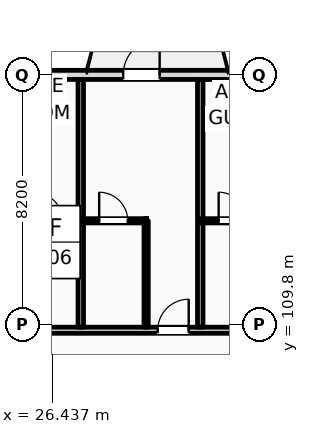
"""IFC4 building model, lengths in metres.
Left out: names, types, materials, properties, quantities, classifications, styles, units other than length and angle.
Written with IfcOpenShell. Run it as: python <this file> out.ifc"""

import sys

from ifc_helpers import new_model, si_unit, direction, frame, frame_2d, origin, place, context, subcontext, project, spatial, rectangle, extrude, element, fill, save


model = new_model("IFC4")
c1 = context("Model", 3, precision=1e-05, world=origin(), true_north=direction((0.0, 1.0)))
c2 = subcontext(c1, "Body", "Model", "MODEL_VIEW")
j1 = project(units=[si_unit("LENGTHUNIT", "METRE"), si_unit("PLANEANGLEUNIT", "RADIAN")], contexts=[c1])
p1 = place(None, origin())
s1 = spatial("IfcSite", under=j1, at=p1, CompositionType="ELEMENT")
p2 = place(p1, origin())
s2 = spatial("IfcBuilding", under=s1, at=p2, CompositionType="ELEMENT")
p3 = place(p2, frame((0.0, 0.0, 24.6)))
s3 = spatial("IfcBuildingStorey", under=s2, at=p3, CompositionType="ELEMENT", Elevation=24.6)
p4 = place(p3, frame((22.5, 118.0, 0.0), z_axis=(0.0, 0.0, 1.0), x_axis=(1.0, 0.0, 0.0)))
e1 = element("IfcWall", 1, at=p4, inside=s3, PredefinedType="STANDARD", context=c2, shape_type="SweptSolid", body=[
    extrude(rectangle(XDim=97.5, YDim=0.3, at=frame_2d((48.75, 0.0))), origin(), (0.0, 0.0, 1.0), 2.78),
])
p5 = place(p4, frame((0.91, 0.0, 0.9)))
e2 = element("IfcOpeningElement", 2, at=p5, cuts=e1, PredefinedType="OPENING", context=c2, shape_type="SweptSolid", body=[
    extrude(rectangle(XDim=0.9, YDim=1.7, at=frame_2d((0.45, 0.85))), frame((0.0, 0.16, 0.0), z_axis=(0.0, -1.0, 0.0), x_axis=(1.0, 0.0, 0.0)), (0.0, 0.0, 1.0), 0.32),
])
p6 = place(p4, frame((6.275, 0.0, 0.0)))
e3 = element("IfcOpeningElement", 3, at=p6, cuts=e1, PredefinedType="OPENING", context=c2, shape_type="SweptSolid", body=[
    extrude(rectangle(XDim=1.2, YDim=2.25, at=frame_2d((0.6, 1.125))), frame((0.0, 0.16, 0.0), z_axis=(0.0, -1.0, 0.0), x_axis=(1.0, 0.0, 0.0)), (0.0, 0.0, 1.0), 0.32),
])
p7 = place(p4, frame((11.42, 0.0, 0.9)))
e4 = element("IfcOpeningElement", 4, at=p7, cuts=e1, PredefinedType="OPENING", context=c2, shape_type="SweptSolid", body=[
    extrude(rectangle(XDim=1.35, YDim=1.7, at=frame_2d((0.675, 0.85))), frame((0.0, 0.16, 0.0), z_axis=(0.0, -1.0, 0.0), x_axis=(1.0, 0.0, 0.0)), (0.0, 0.0, 1.0), 0.32),
])
p8 = place(p4, frame((14.345, 0.0, 0.9)))
e5 = element("IfcOpeningElement", 5, at=p8, cuts=e1, PredefinedType="OPENING", context=c2, shape_type="SweptSolid", body=[
    extrude(rectangle(XDim=1.8, YDim=1.7, at=frame_2d((0.9, 0.85))), frame((0.0, 0.16, 0.0), z_axis=(0.0, -1.0, 0.0), x_axis=(1.0, 0.0, 0.0)), (0.0, 0.0, 1.0), 0.32),
])
p9 = place(p4, frame((19.27, 0.0, 0.9)))
e6 = element("IfcOpeningElement", 6, at=p9, cuts=e1, PredefinedType="OPENING", context=c2, shape_type="SweptSolid", body=[
    extrude(rectangle(XDim=1.95, YDim=1.7, at=frame_2d((0.975, 0.85))), frame((0.0, 0.16, 0.0), z_axis=(0.0, -1.0, 0.0), x_axis=(1.0, 0.0, 0.0)), (0.0, 0.0, 1.0), 0.32),
])
p10 = place(p4, frame((22.97, 0.0, 0.0)))
e7 = element("IfcOpeningElement", 7, at=p10, cuts=e1, PredefinedType="OPENING", context=c2, shape_type="SweptSolid", body=[
    extrude(rectangle(XDim=1.2, YDim=2.25, at=frame_2d((0.6, 1.125))), frame((0.0, 0.16, 0.0), z_axis=(0.0, -1.0, 0.0), x_axis=(1.0, 0.0, 0.0)), (0.0, 0.0, 1.0), 0.32),
])
p11 = place(p4, frame((26.92, 0.0, 0.9)))
e8 = element("IfcOpeningElement", 8, at=p11, cuts=e1, PredefinedType="OPENING", context=c2, shape_type="SweptSolid", body=[
    extrude(rectangle(XDim=2.25, YDim=1.7, at=frame_2d((1.125, 0.85))), frame((0.0, 0.16, 0.0), z_axis=(0.0, -1.0, 0.0), x_axis=(1.0, 0.0, 0.0)), (0.0, 0.0, 1.0), 0.32),
])
p12 = place(p4, frame((30.645, 0.0, 0.9)))
e9 = element("IfcOpeningElement", 9, at=p12, cuts=e1, PredefinedType="OPENING", context=c2, shape_type="SweptSolid", body=[
    extrude(rectangle(XDim=2.4, YDim=1.7, at=frame_2d((1.2, 0.85))), frame((0.0, 0.16, 0.0), z_axis=(0.0, -1.0, 0.0), x_axis=(1.0, 0.0, 0.0)), (0.0, 0.0, 1.0), 0.32),
])
p13 = place(p4, frame((36.71, 0.0, 0.0)))
e10 = element("IfcOpeningElement", 10, at=p13, cuts=e1, PredefinedType="OPENING", context=c2, shape_type="SweptSolid", body=[
    extrude(rectangle(XDim=1.2, YDim=2.25, at=frame_2d((0.6, 1.125))), frame((0.0, 0.16, 0.0), z_axis=(0.0, -1.0, 0.0), x_axis=(1.0, 0.0, 0.0)), (0.0, 0.0, 1.0), 0.32),
])
p14 = place(p4, frame((39.17, 0.0, 0.0)))
e11 = element("IfcOpeningElement", 11, at=p14, cuts=e1, PredefinedType="OPENING", context=c2, shape_type="SweptSolid", body=[
    extrude(rectangle(XDim=1.2, YDim=2.25, at=frame_2d((0.6, 1.125))), frame((0.0, 0.16, 0.0), z_axis=(0.0, -1.0, 0.0), x_axis=(1.0, 0.0, 0.0)), (0.0, 0.0, 1.0), 0.32),
])
p15 = place(p4, frame((43.22, 0.0, 0.9)))
e12 = element("IfcOpeningElement", 12, at=p15, cuts=e1, PredefinedType="OPENING", context=c2, shape_type="SweptSolid", body=[
    extrude(rectangle(XDim=2.85, YDim=1.7, at=frame_2d((1.425, 0.85))), frame((0.0, 0.16, 0.0), z_axis=(0.0, -1.0, 0.0), x_axis=(1.0, 0.0, 0.0)), (0.0, 0.0, 1.0), 0.32),
])
p16 = place(p4, frame((47.29, 0.0, 0.9)))
e13 = element("IfcOpeningElement", 13, at=p16, cuts=e1, PredefinedType="OPENING", context=c2, shape_type="SweptSolid", body=[
    extrude(rectangle(XDim=1.35, YDim=1.7, at=frame_2d((0.675, 0.85))), frame((0.0, 0.16, 0.0), z_axis=(0.0, -1.0, 0.0), x_axis=(1.0, 0.0, 0.0)), (0.0, 0.0, 1.0), 0.32),
])
p17 = place(p4, frame((52.91, 0.0, 0.0)))
e14 = element("IfcOpeningElement", 14, at=p17, cuts=e1, PredefinedType="OPENING", context=c2, shape_type="SweptSolid", body=[
    extrude(rectangle(XDim=1.2, YDim=2.25, at=frame_2d((0.6, 1.125))), frame((0.0, 0.16, 0.0), z_axis=(0.0, -1.0, 0.0), x_axis=(1.0, 0.0, 0.0)), (0.0, 0.0, 1.0), 0.32),
])
p18 = place(p4, frame((55.69, 0.0, 0.9)))
e15 = element("IfcOpeningElement", 15, at=p18, cuts=e1, PredefinedType="OPENING", context=c2, shape_type="SweptSolid", body=[
    extrude(rectangle(XDim=0.9, YDim=1.7, at=frame_2d((0.45, 0.85))), frame((0.0, 0.16, 0.0), z_axis=(0.0, -1.0, 0.0), x_axis=(1.0, 0.0, 0.0)), (0.0, 0.0, 1.0), 0.32),
])
p19 = place(p4, frame((59.82, 0.0, 0.9)))
e16 = element("IfcOpeningElement", 16, at=p19, cuts=e1, PredefinedType="OPENING", context=c2, shape_type="SweptSolid", body=[
    extrude(rectangle(XDim=3.25, YDim=1.7, at=frame_2d((1.625, 0.85))), frame((0.0, 0.16, 0.0), z_axis=(0.0, -1.0, 0.0), x_axis=(1.0, 0.0, 0.0)), (0.0, 0.0, 1.0), 0.32),
])
p20 = place(p4, frame((65.89, 0.0, 0.9)))
e17 = element("IfcOpeningElement", 17, at=p20, cuts=e1, PredefinedType="OPENING", context=c2, shape_type="SweptSolid", body=[
    extrude(rectangle(XDim=1.1, YDim=1.7, at=frame_2d((0.55, 0.85))), frame((0.0, 0.16, 0.0), z_axis=(0.0, -1.0, 0.0), x_axis=(1.0, 0.0, 0.0)), (0.0, 0.0, 1.0), 0.32),
])
p21 = place(p4, frame((69.245, 0.0, 0.0)))
e18 = element("IfcOpeningElement", 18, at=p21, cuts=e1, PredefinedType="OPENING", context=c2, shape_type="SweptSolid", body=[
    extrude(rectangle(XDim=1.2, YDim=2.25, at=frame_2d((0.6, 1.125))), frame((0.0, 0.16, 0.0), z_axis=(0.0, -1.0, 0.0), x_axis=(1.0, 0.0, 0.0)), (0.0, 0.0, 1.0), 0.32),
])
p22 = place(p4, frame((73.69, 0.0, 0.9)))
e19 = element("IfcOpeningElement", 19, at=p22, cuts=e1, PredefinedType="OPENING", context=c2, shape_type="SweptSolid", body=[
    extrude(rectangle(XDim=1.8, YDim=1.7, at=frame_2d((0.9, 0.85))), frame((0.0, 0.16, 0.0), z_axis=(0.0, -1.0, 0.0), x_axis=(1.0, 0.0, 0.0)), (0.0, 0.0, 1.0), 0.32),
])
p23 = place(p4, frame((76.62, 0.0, 0.9)))
e20 = element("IfcOpeningElement", 20, at=p23, cuts=e1, PredefinedType="OPENING", context=c2, shape_type="SweptSolid", body=[
    extrude(rectangle(XDim=3.25, YDim=1.7, at=frame_2d((1.625, 0.85))), frame((0.0, 0.16, 0.0), z_axis=(0.0, -1.0, 0.0), x_axis=(1.0, 0.0, 0.0)), (0.0, 0.0, 1.0), 0.32),
])
p24 = place(p4, frame((81.895, 0.0, 0.9)))
e21 = element("IfcOpeningElement", 21, at=p24, cuts=e1, PredefinedType="OPENING", context=c2, shape_type="SweptSolid", body=[
    extrude(rectangle(XDim=1.1, YDim=1.5, at=frame_2d((0.55, 0.75))), frame((0.0, 0.16, 0.0), z_axis=(0.0, -1.0, 0.0), x_axis=(1.0, 0.0, 0.0)), (0.0, 0.0, 1.0), 0.32),
])
p25 = place(p4, frame((86.02, 0.0, 0.9)))
e22 = element("IfcOpeningElement", 22, at=p25, cuts=e1, PredefinedType="OPENING", context=c2, shape_type="SweptSolid", body=[
    extrude(rectangle(XDim=1.25, YDim=1.6, at=frame_2d((0.625, 0.8))), frame((0.0, 0.16, 0.0), z_axis=(0.0, -1.0, 0.0), x_axis=(1.0, 0.0, 0.0)), (0.0, 0.0, 1.0), 0.32),
])
p26 = place(p4, frame((90.145, 0.0, 0.9)))
e23 = element("IfcOpeningElement", 23, at=p26, cuts=e1, PredefinedType="OPENING", context=c2, shape_type="SweptSolid", body=[
    extrude(rectangle(XDim=1.4, YDim=1.7, at=frame_2d((0.7, 0.85))), frame((0.0, 0.16, 0.0), z_axis=(0.0, -1.0, 0.0), x_axis=(1.0, 0.0, 0.0)), (0.0, 0.0, 1.0), 0.32),
])
p27 = place(p4, frame((94.155, 0.0, 0.9)))
e24 = element("IfcOpeningElement", 24, at=p27, cuts=e1, PredefinedType="OPENING", context=c2, shape_type="SweptSolid", body=[
    extrude(rectangle(XDim=1.6, YDim=1.7, at=frame_2d((0.8, 0.85))), frame((0.0, 0.16, 0.0), z_axis=(0.0, -1.0, 0.0), x_axis=(1.0, 0.0, 0.0)), (0.0, 0.0, 1.0), 0.32),
])
p28 = place(p3, frame((10.65, 109.6, 0.0), z_axis=(0.0, 0.0, 1.0), x_axis=(1.0, 0.0, 0.0)))
e25 = element("IfcWall", 25, at=p28, inside=s3, PredefinedType="PARTITIONING", context=c2, shape_type="SweptSolid", body=[
    extrude(rectangle(XDim=109.21, YDim=0.2, at=frame_2d((54.605, 0.0))), origin(), (0.0, 0.0, 1.0), 2.78),
])
p29 = place(p28, frame((12.705, 0.0, 0.0)))
e26 = element("IfcOpeningElement", 26, at=p29, cuts=e25, PredefinedType="OPENING", context=c2, shape_type="SweptSolid", body=[
    extrude(rectangle(XDim=1.02, YDim=2.2, at=frame_2d((0.51, 1.1))), frame((0.0, 0.11, 0.0), z_axis=(0.0, -1.0, 0.0), x_axis=(1.0, 0.0, 0.0)), (0.0, 0.0, 1.0), 0.22),
])
p30 = place(p28, frame((19.26, 0.0, 0.0)))
e27 = element("IfcOpeningElement", 27, at=p30, cuts=e25, PredefinedType="OPENING", context=c2, shape_type="SweptSolid", body=[
    extrude(rectangle(XDim=1.02, YDim=2.2, at=frame_2d((0.51, 1.1))), frame((0.0, 0.11, 0.0), z_axis=(0.0, -1.0, 0.0), x_axis=(1.0, 0.0, 0.0)), (0.0, 0.0, 1.0), 0.22),
])
p31 = place(p28, frame((23.71, 0.0, 0.0)))
e28 = element("IfcOpeningElement", 28, at=p31, cuts=e25, PredefinedType="OPENING", context=c2, shape_type="SweptSolid", body=[
    extrude(rectangle(XDim=1.02, YDim=2.2, at=frame_2d((0.51, 1.1))), frame((0.0, 0.11, 0.0), z_axis=(0.0, -1.0, 0.0), x_axis=(1.0, 0.0, 0.0)), (0.0, 0.0, 1.0), 0.22),
])
p32 = place(p28, frame((27.66, 0.0, 0.0)))
e29 = element("IfcOpeningElement", 29, at=p32, cuts=e25, PredefinedType="OPENING", context=c2, shape_type="SweptSolid", body=[
    extrude(rectangle(XDim=1.02, YDim=2.2, at=frame_2d((0.51, 1.1))), frame((0.0, 0.11, 0.0), z_axis=(0.0, -1.0, 0.0), x_axis=(1.0, 0.0, 0.0)), (0.0, 0.0, 1.0), 0.22),
])
p33 = place(p28, frame((31.89, 0.0, 0.0)))
e30 = element("IfcOpeningElement", 30, at=p33, cuts=e25, PredefinedType="OPENING", context=c2, shape_type="SweptSolid", body=[
    extrude(rectangle(XDim=0.96, YDim=2.2, at=frame_2d((0.48, 1.1))), frame((0.0, 0.11, 0.0), z_axis=(0.0, -1.0, 0.0), x_axis=(1.0, 0.0, 0.0)), (0.0, 0.0, 1.0), 0.22),
])
p34 = place(p28, frame((33.94, 0.0, 0.0)))
e31 = element("IfcOpeningElement", 31, at=p34, cuts=e25, PredefinedType="OPENING", context=c2, shape_type="SweptSolid", body=[
    extrude(rectangle(XDim=0.96, YDim=2.2, at=frame_2d((0.48, 1.1))), frame((0.0, 0.11, 0.0), z_axis=(0.0, -1.0, 0.0), x_axis=(1.0, 0.0, 0.0)), (0.0, 0.0, 1.0), 0.22),
])
p35 = place(p28, frame((40.29, 0.0, 0.0)))
e32 = element("IfcOpeningElement", 32, at=p35, cuts=e25, PredefinedType="OPENING", context=c2, shape_type="SweptSolid", body=[
    extrude(rectangle(XDim=0.96, YDim=2.2, at=frame_2d((0.48, 1.1))), frame((0.0, 0.11, 0.0), z_axis=(0.0, -1.0, 0.0), x_axis=(1.0, 0.0, 0.0)), (0.0, 0.0, 1.0), 0.22),
])
p36 = place(p28, frame((42.34, 0.0, 0.0)))
e33 = element("IfcOpeningElement", 33, at=p36, cuts=e25, PredefinedType="OPENING", context=c2, shape_type="SweptSolid", body=[
    extrude(rectangle(XDim=0.96, YDim=2.2, at=frame_2d((0.48, 1.1))), frame((0.0, 0.11, 0.0), z_axis=(0.0, -1.0, 0.0), x_axis=(1.0, 0.0, 0.0)), (0.0, 0.0, 1.0), 0.22),
])
p37 = place(p28, frame((48.69, 0.0, 0.0)))
e34 = element("IfcOpeningElement", 34, at=p37, cuts=e25, PredefinedType="OPENING", context=c2, shape_type="SweptSolid", body=[
    extrude(rectangle(XDim=0.96, YDim=2.2, at=frame_2d((0.48, 1.1))), frame((0.0, 0.11, 0.0), z_axis=(0.0, -1.0, 0.0), x_axis=(1.0, 0.0, 0.0)), (0.0, 0.0, 1.0), 0.22),
])
p38 = place(p28, frame((50.74, 0.0, 0.0)))
e35 = element("IfcOpeningElement", 35, at=p38, cuts=e25, PredefinedType="OPENING", context=c2, shape_type="SweptSolid", body=[
    extrude(rectangle(XDim=0.96, YDim=2.2, at=frame_2d((0.48, 1.1))), frame((0.0, 0.11, 0.0), z_axis=(0.0, -1.0, 0.0), x_axis=(1.0, 0.0, 0.0)), (0.0, 0.0, 1.0), 0.22),
])
p39 = place(p28, frame((57.09, 0.0, 0.0)))
e36 = element("IfcOpeningElement", 36, at=p39, cuts=e25, PredefinedType="OPENING", context=c2, shape_type="SweptSolid", body=[
    extrude(rectangle(XDim=0.96, YDim=2.2, at=frame_2d((0.48, 1.1))), frame((0.0, 0.11, 0.0), z_axis=(0.0, -1.0, 0.0), x_axis=(1.0, 0.0, 0.0)), (0.0, 0.0, 1.0), 0.22),
])
p40 = place(p28, frame((59.14, 0.0, 0.0)))
e37 = element("IfcOpeningElement", 37, at=p40, cuts=e25, PredefinedType="OPENING", context=c2, shape_type="SweptSolid", body=[
    extrude(rectangle(XDim=0.96, YDim=2.2, at=frame_2d((0.48, 1.1))), frame((0.0, 0.11, 0.0), z_axis=(0.0, -1.0, 0.0), x_axis=(1.0, 0.0, 0.0)), (0.0, 0.0, 1.0), 0.22),
])
p41 = place(p28, frame((65.49, 0.0, 0.0)))
e38 = element("IfcOpeningElement", 38, at=p41, cuts=e25, PredefinedType="OPENING", context=c2, shape_type="SweptSolid", body=[
    extrude(rectangle(XDim=0.96, YDim=2.2, at=frame_2d((0.48, 1.1))), frame((0.0, 0.11, 0.0), z_axis=(0.0, -1.0, 0.0), x_axis=(1.0, 0.0, 0.0)), (0.0, 0.0, 1.0), 0.22),
])
p42 = place(p28, frame((67.54, 0.0, 0.0)))
e39 = element("IfcOpeningElement", 39, at=p42, cuts=e25, PredefinedType="OPENING", context=c2, shape_type="SweptSolid", body=[
    extrude(rectangle(XDim=0.96, YDim=2.2, at=frame_2d((0.48, 1.1))), frame((0.0, 0.11, 0.0), z_axis=(0.0, -1.0, 0.0), x_axis=(1.0, 0.0, 0.0)), (0.0, 0.0, 1.0), 0.22),
])
p43 = place(p28, frame((73.89, 0.0, 0.0)))
e40 = element("IfcOpeningElement", 40, at=p43, cuts=e25, PredefinedType="OPENING", context=c2, shape_type="SweptSolid", body=[
    extrude(rectangle(XDim=0.96, YDim=2.2, at=frame_2d((0.48, 1.1))), frame((0.0, 0.11, 0.0), z_axis=(0.0, -1.0, 0.0), x_axis=(1.0, 0.0, 0.0)), (0.0, 0.0, 1.0), 0.22),
])
p44 = place(p28, frame((78.09, 0.0, 0.0)))
e41 = element("IfcOpeningElement", 41, at=p44, cuts=e25, PredefinedType="OPENING", context=c2, shape_type="SweptSolid", body=[
    extrude(rectangle(XDim=0.96, YDim=2.2, at=frame_2d((0.48, 1.1))), frame((0.0, 0.11, 0.0), z_axis=(0.0, -1.0, 0.0), x_axis=(1.0, 0.0, 0.0)), (0.0, 0.0, 1.0), 0.22),
])
p45 = place(p28, frame((82.29, 0.0, 0.0)))
e42 = element("IfcOpeningElement", 42, at=p45, cuts=e25, PredefinedType="OPENING", context=c2, shape_type="SweptSolid", body=[
    extrude(rectangle(XDim=0.96, YDim=2.2, at=frame_2d((0.48, 1.1))), frame((0.0, 0.11, 0.0), z_axis=(0.0, -1.0, 0.0), x_axis=(1.0, 0.0, 0.0)), (0.0, 0.0, 1.0), 0.22),
])
p46 = place(p28, frame((86.49, 0.0, 0.0)))
e43 = element("IfcOpeningElement", 43, at=p46, cuts=e25, PredefinedType="OPENING", context=c2, shape_type="SweptSolid", body=[
    extrude(rectangle(XDim=0.96, YDim=2.2, at=frame_2d((0.48, 1.1))), frame((0.0, 0.11, 0.0), z_axis=(0.0, -1.0, 0.0), x_axis=(1.0, 0.0, 0.0)), (0.0, 0.0, 1.0), 0.22),
])
p47 = place(p28, frame((88.54, 0.0, 0.0)))
e44 = element("IfcOpeningElement", 44, at=p47, cuts=e25, PredefinedType="OPENING", context=c2, shape_type="SweptSolid", body=[
    extrude(rectangle(XDim=0.96, YDim=2.2, at=frame_2d((0.48, 1.1))), frame((0.0, 0.11, 0.0), z_axis=(0.0, -1.0, 0.0), x_axis=(1.0, 0.0, 0.0)), (0.0, 0.0, 1.0), 0.22),
])
p48 = place(p28, frame((94.89, 0.0, 0.0)))
e45 = element("IfcOpeningElement", 45, at=p48, cuts=e25, PredefinedType="OPENING", context=c2, shape_type="SweptSolid", body=[
    extrude(rectangle(XDim=0.96, YDim=2.2, at=frame_2d((0.48, 1.1))), frame((0.0, 0.11, 0.0), z_axis=(0.0, -1.0, 0.0), x_axis=(1.0, 0.0, 0.0)), (0.0, 0.0, 1.0), 0.22),
])
p49 = place(p28, frame((96.94, 0.0, 0.0)))
e46 = element("IfcOpeningElement", 46, at=p49, cuts=e25, PredefinedType="OPENING", context=c2, shape_type="SweptSolid", body=[
    extrude(rectangle(XDim=0.96, YDim=2.2, at=frame_2d((0.48, 1.1))), frame((0.0, 0.11, 0.0), z_axis=(0.0, -1.0, 0.0), x_axis=(1.0, 0.0, 0.0)), (0.0, 0.0, 1.0), 0.22),
])
p50 = place(p28, frame((103.29, 0.0, 0.0)))
e47 = element("IfcOpeningElement", 47, at=p50, cuts=e25, PredefinedType="OPENING", context=c2, shape_type="SweptSolid", body=[
    extrude(rectangle(XDim=0.96, YDim=2.2, at=frame_2d((0.48, 1.1))), frame((0.0, 0.11, 0.0), z_axis=(0.0, -1.0, 0.0), x_axis=(1.0, 0.0, 0.0)), (0.0, 0.0, 1.0), 0.22),
])
p51 = place(p28, frame((105.25, 0.0, 0.0)))
e48 = element("IfcOpeningElement", 48, at=p51, cuts=e25, PredefinedType="OPENING", context=c2, shape_type="SweptSolid", body=[
    extrude(rectangle(XDim=0.96, YDim=2.2, at=frame_2d((0.48, 1.1))), frame((0.0, 0.11, 0.0), z_axis=(0.0, -1.0, 0.0), x_axis=(1.0, 0.0, 0.0)), (0.0, 0.0, 1.0), 0.22),
])
p52 = place(p28, frame((2.716, 0.0, 0.0)))
e49 = element("IfcOpeningElement", 49, at=p52, cuts=e25, PredefinedType="OPENING", context=c2, shape_type="SweptSolid", body=[
    extrude(rectangle(XDim=1.35, YDim=2.25, at=frame_2d((0.675, 1.125))), frame((0.0, 0.11, 0.0), z_axis=(0.0, -1.0, 0.0), x_axis=(1.0, 0.0, 0.0)), (0.0, 0.0, 1.0), 0.22),
])
p53 = place(p28, frame((6.65, 0.0, 0.0)))
e50 = element("IfcOpeningElement", 50, at=p53, cuts=e25, PredefinedType="OPENING", context=c2, shape_type="SweptSolid", body=[
    extrude(rectangle(XDim=1.35, YDim=2.25, at=frame_2d((0.675, 1.125))), frame((0.0, 0.11, 0.0), z_axis=(0.0, -1.0, 0.0), x_axis=(1.0, 0.0, 0.0)), (0.0, 0.0, 1.0), 0.22),
])
p54 = place(p28, frame((10.583, 0.0, 0.0)))
e51 = element("IfcOpeningElement", 51, at=p54, cuts=e25, PredefinedType="OPENING", context=c2, shape_type="SweptSolid", body=[
    extrude(rectangle(XDim=1.35, YDim=2.25, at=frame_2d((0.675, 1.125))), frame((0.0, 0.11, 0.0), z_axis=(0.0, -1.0, 0.0), x_axis=(1.0, 0.0, 0.0)), (0.0, 0.0, 1.0), 0.22),
])
p55 = place(p3, frame((27.38, 109.7, 0.0), z_axis=(0.0, 0.0, 1.0), x_axis=(0.0, 1.0, 0.0)))
e52 = element("IfcWall", 52, at=p55, inside=s3, PredefinedType="PARTITIONING", context=c2, shape_type="SweptSolid", body=[
    extrude(rectangle(XDim=8.15, YDim=0.18, at=frame_2d((4.075, 0.0))), origin(), (0.0, 0.0, 1.0), 3.34),
])
p56 = place(p3, frame((25.23, 113.2, 0.0), z_axis=(0.0, 0.0, 1.0), x_axis=(1.0, 0.0, 0.0)))
e53 = element("IfcWall", 53, at=p56, inside=s3, PredefinedType="PARTITIONING", context=c2, shape_type="SweptSolid", body=[
    extrude(rectangle(XDim=2.15, YDim=0.14, at=frame_2d((1.075, 0.0))), origin(), (0.0, 0.0, 1.0), 3.34),
])
p57 = place(p56, frame((0.605, 0.0, 0.0)))
e54 = element("IfcOpeningElement", 54, at=p57, cuts=e53, PredefinedType="OPENING", context=c2, shape_type="SweptSolid", body=[
    extrude(rectangle(XDim=0.94, YDim=2.15, at=frame_2d((0.47, 1.075))), frame((0.0, 0.08, 0.0), z_axis=(0.0, -1.0, 0.0), x_axis=(1.0, 0.0, 0.0)), (0.0, 0.0, 1.0), 0.16),
])
p58 = place(p3, frame((31.31, 109.7, 0.0), z_axis=(0.0, 0.0, 1.0), x_axis=(0.0, 1.0, 0.0)))
e55 = element("IfcWall", 55, at=p58, inside=s3, PredefinedType="PARTITIONING", context=c2, shape_type="SweptSolid", body=[
    extrude(rectangle(XDim=8.15, YDim=0.18, at=frame_2d((4.075, 0.0))), origin(), (0.0, 0.0, 1.0), 3.34),
])
p59 = place(p3, frame((29.53, 109.7, 0.0), z_axis=(0.0, 0.0, 1.0), x_axis=(0.0, 1.0, 0.0)))
e56 = element("IfcWall", 56, at=p59, inside=s3, PredefinedType="PARTITIONING", context=c2, shape_type="SweptSolid", body=[
    extrude(rectangle(XDim=3.5, YDim=0.14, at=frame_2d((1.75, 0.0))), origin(), (0.0, 0.0, 1.0), 3.34),
])
p60 = place(p3, frame((27.38, 113.2, 0.0), z_axis=(0.0, 0.0, 1.0), x_axis=(1.0, 0.0, 0.0)))
e57 = element("IfcWall", 57, at=p60, inside=s3, PredefinedType="PARTITIONING", context=c2, shape_type="SweptSolid", body=[
    extrude(rectangle(XDim=2.15, YDim=0.14, at=frame_2d((1.075, 0.0))), origin(), (0.0, 0.0, 1.0), 3.34),
])
p61 = place(p60, frame((0.605, 0.0, 0.0)))
e58 = element("IfcOpeningElement", 58, at=p61, cuts=e57, PredefinedType="OPENING", context=c2, shape_type="SweptSolid", body=[
    extrude(rectangle(XDim=0.94, YDim=2.15, at=frame_2d((0.47, 1.075))), frame((0.0, 0.08, 0.0), z_axis=(0.0, -1.0, 0.0), x_axis=(1.0, 0.0, 0.0)), (0.0, 0.0, 1.0), 0.16),
])
p62 = place(p3, frame((31.31, 113.2, 0.0), z_axis=(0.0, 0.0, 1.0), x_axis=(1.0, 0.0, 0.0)))
e59 = element("IfcWall", 59, at=p62, inside=s3, PredefinedType="PARTITIONING", context=c2, shape_type="SweptSolid", body=[
    extrude(rectangle(XDim=2.15, YDim=0.14, at=frame_2d((1.075, 0.0))), origin(), (0.0, 0.0, 1.0), 3.34),
])
p63 = place(p62, frame((0.605, 0.0, 0.0)))
e60 = element("IfcOpeningElement", 60, at=p63, cuts=e59, PredefinedType="OPENING", context=c2, shape_type="SweptSolid", body=[
    extrude(rectangle(XDim=0.94, YDim=2.15, at=frame_2d((0.47, 1.075))), frame((0.0, 0.08, 0.0), z_axis=(0.0, -1.0, 0.0), x_axis=(1.0, 0.0, 0.0)), (0.0, 0.0, 1.0), 0.16),
])
p64 = place(p6, origin())
e61 = element("IfcDoor", 61, at=p64, inside=s3, OperationType="SINGLE_SWING_RIGHT", PredefinedType="DOOR", context=c2, shape_type="SweptSolid", body=[
    extrude(rectangle(XDim=1.2, YDim=2.25, at=frame_2d((0.6, 1.125))), frame((0.0, 0.025, 0.0), z_axis=(0.0, -1.0, 0.0), x_axis=(1.0, 0.0, 0.0)), (0.0, 0.0, 1.0), 0.05),
])
fill(e3, e61)
p65 = place(p57, origin())
e62 = element("IfcDoor", 62, at=p65, inside=s3, OperationType="SINGLE_SWING_LEFT", PredefinedType="DOOR", context=c2, shape_type="SweptSolid", body=[
    extrude(rectangle(XDim=0.94, YDim=2.15, at=frame_2d((0.47, 1.075))), frame((0.0, 0.025, 0.0), z_axis=(0.0, -1.0, 0.0), x_axis=(1.0, 0.0, 0.0)), (0.0, 0.0, 1.0), 0.05),
])
fill(e54, e62)
p66 = place(p30, origin())
e63 = element("IfcDoor", 63, at=p66, inside=s3, OperationType="SINGLE_SWING_RIGHT", PredefinedType="DOOR", context=c2, shape_type="SweptSolid", body=[
    extrude(rectangle(XDim=1.02, YDim=2.2, at=frame_2d((0.51, 1.1))), frame((0.0, 0.025, 0.0), z_axis=(0.0, -1.0, 0.0), x_axis=(1.0, 0.0, 0.0)), (0.0, 0.0, 1.0), 0.05),
])
fill(e27, e63)
p67 = place(p61, origin())
e64 = element("IfcDoor", 64, at=p67, inside=s3, OperationType="SINGLE_SWING_LEFT", PredefinedType="DOOR", context=c2, shape_type="SweptSolid", body=[
    extrude(rectangle(XDim=0.94, YDim=2.15, at=frame_2d((0.47, 1.075))), frame((0.0, 0.025, 0.0), z_axis=(0.0, -1.0, 0.0), x_axis=(1.0, 0.0, 0.0)), (0.0, 0.0, 1.0), 0.05),
])
fill(e58, e64)
p68 = place(p63, origin())
e65 = element("IfcDoor", 65, at=p68, inside=s3, OperationType="SINGLE_SWING_LEFT", PredefinedType="DOOR", context=c2, shape_type="SweptSolid", body=[
    extrude(rectangle(XDim=0.94, YDim=2.15, at=frame_2d((0.47, 1.075))), frame((0.0, 0.025, 0.0), z_axis=(0.0, -1.0, 0.0), x_axis=(1.0, 0.0, 0.0)), (0.0, 0.0, 1.0), 0.05),
])
fill(e60, e65)
save(model, sys.argv[1])
